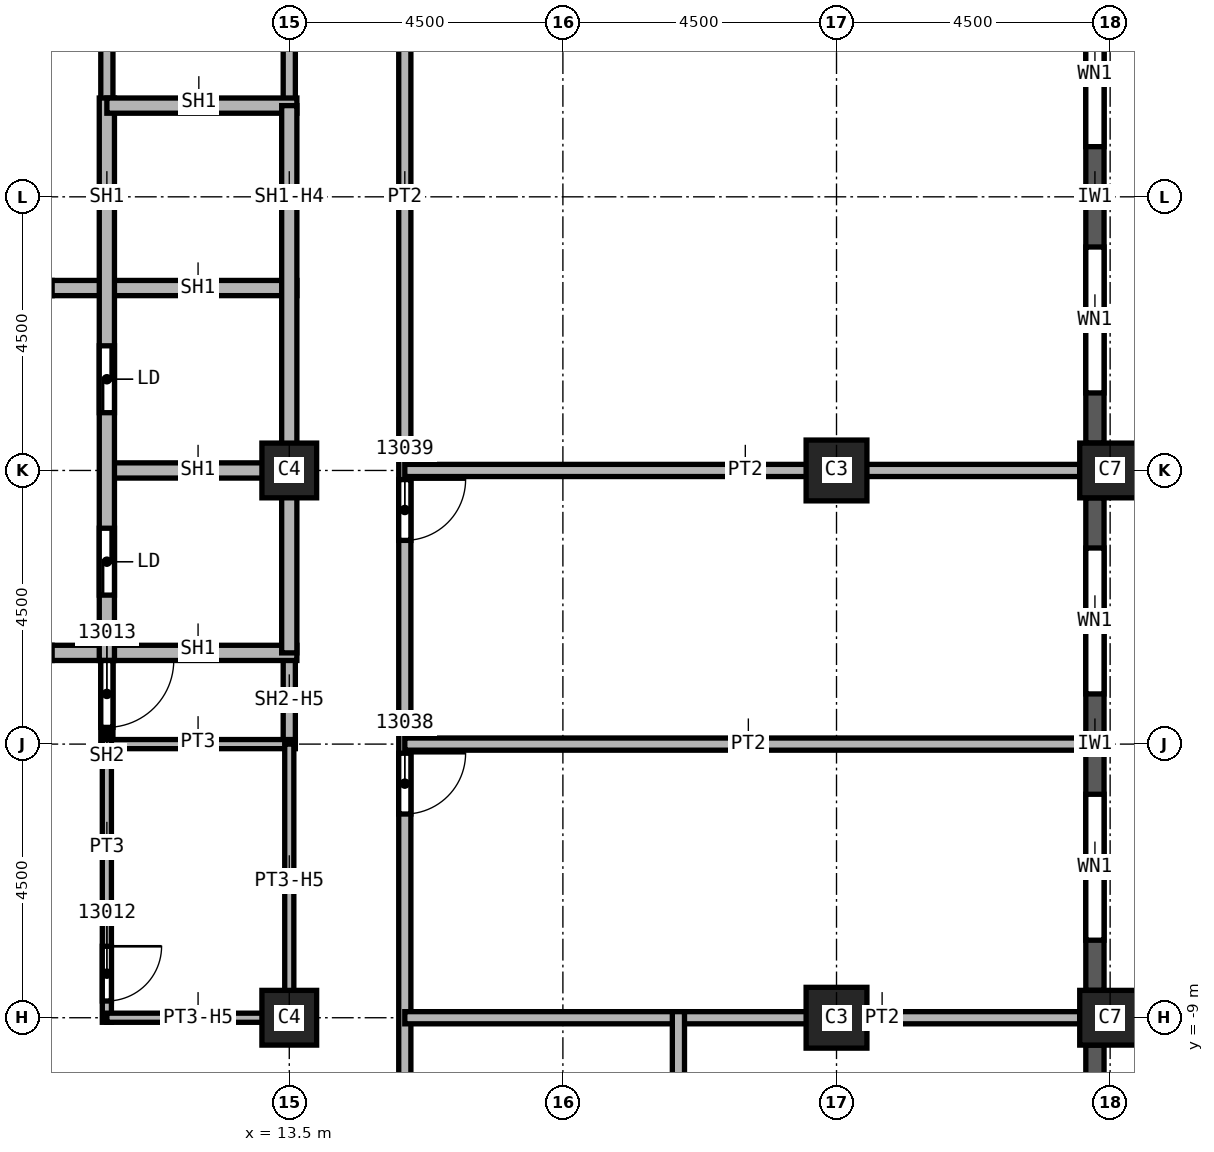
"""IFC4 building model, lengths in metres.
Left out: names, types, materials, properties, quantities, classifications, styles, units other than length and angle.
Written with IfcOpenShell. Run it as: python <this file> out.ifc"""

import sys

from ifc_helpers import new_model, si_unit, direction, frame, frame_2d, origin, origin_2d, place, context, subcontext, project, spatial, rectangle, extrude, element, fill, save


model = new_model("IFC4")
c1 = context("Model", 3, precision=1e-05, world=origin(), true_north=direction((0.0, 1.0)))
c2 = subcontext(c1, "Body", "Model", "MODEL_VIEW")
j1 = project(units=[si_unit("LENGTHUNIT", "METRE"), si_unit("PLANEANGLEUNIT", "RADIAN")], contexts=[c1])
p1 = place(None, origin())
s1 = spatial("IfcSite", under=j1, at=p1, CompositionType="ELEMENT")
p2 = place(p1, origin())
s2 = spatial("IfcBuilding", under=s1, at=p2, CompositionType="ELEMENT")
p3 = place(p2, frame((0.0, 0.0, 208.0)))
s3 = spatial("IfcBuildingStorey", under=s2, at=p3, CompositionType="ELEMENT", Elevation=208.0)
for number, where, z_axis, x_axis in (
    (1, (22.5, 0.0, 0.0), (0.0, 0.0, 1.0), (1.0, 0.0, 0.0)),
    (2, (22.5, -9.0, 0.0), (0.0, 0.0, 1.0), (1.0, 0.0, 0.0)),
):
    element("IfcColumn", number, at=place(p3, frame(where, z_axis=z_axis, x_axis=x_axis)), inside=s3, PredefinedType="COLUMN", context=c2, shape_type="SweptSolid", body=[
        extrude(rectangle(XDim=1.0, YDim=1.0, at=origin_2d()), origin(), (0.0, 0.0, 1.0), 3.72),
    ])
for number, where, z_axis, x_axis in (
    (3, (13.5, 0.0, 0.0), (0.0, 0.0, 1.0), (1.0, 0.0, 0.0)),
    (4, (13.5, -9.0, 0.0), (0.0, 0.0, 1.0), (1.0, 0.0, 0.0)),
):
    element("IfcColumn", number, at=place(p3, frame(where, z_axis=z_axis, x_axis=x_axis)), inside=s3, PredefinedType="COLUMN", context=c2, shape_type="SweptSolid", body=[
        extrude(rectangle(XDim=0.9, YDim=0.9, at=origin_2d()), origin(), (0.0, 0.0, 1.0), 3.72),
    ])
for number, where, z_axis, x_axis in (
    (5, (27.0, 0.0, 0.0), (0.0, 0.0, 1.0), (0.0, 1.0, 0.0)),
    (6, (27.0, -9.0, 0.0), (0.0, 0.0, 1.0), (0.0, 1.0, 0.0)),
):
    element("IfcColumn", number, at=place(p3, frame(where, z_axis=z_axis, x_axis=x_axis)), inside=s3, PredefinedType="COLUMN", context=c2, shape_type="SweptSolid", body=[
        extrude(rectangle(XDim=0.9, YDim=1.0, at=origin_2d()), origin(), (0.0, 0.0, 1.0), 3.72),
    ])
p4 = place(p3, frame((26.75, -17.55, 0.0), z_axis=(0.0, 0.0, 1.0), x_axis=(0.0, 1.0, 0.0)))
e7 = element("IfcWall", 7, at=p4, inside=s3, PredefinedType="SOLIDWALL", context=c2, shape_type="SweptSolid", body=[
    extrude(rectangle(XDim=8.1, YDim=0.3, at=frame_2d((4.05, 0.0))), origin(), (0.0, 0.0, 1.0), 3.12),
])
p5 = place(p4, frame((0.825, 0.0, 0.8)))
e8 = element("IfcOpeningElement", 8, at=p5, cuts=e7, PredefinedType="OPENING", context=c2, shape_type="SweptSolid", body=[
    extrude(rectangle(XDim=2.4, YDim=1.95, at=frame_2d((1.2, 0.975))), frame((0.0, 0.15, 0.0), z_axis=(0.0, -1.0, 0.0), x_axis=(1.0, 0.0, 0.0)), (0.0, 0.0, 1.0), 0.3),
])
p6 = place(p4, frame((4.875, 0.0, 0.8)))
e9 = element("IfcOpeningElement", 9, at=p6, cuts=e7, PredefinedType="OPENING", context=c2, shape_type="SweptSolid", body=[
    extrude(rectangle(XDim=2.4, YDim=1.95, at=frame_2d((1.2, 0.975))), frame((0.0, 0.15, 0.0), z_axis=(0.0, -1.0, 0.0), x_axis=(1.0, 0.0, 0.0)), (0.0, 0.0, 1.0), 0.3),
])
p7 = place(p3, frame((26.75, -8.55, 0.0), z_axis=(0.0, 0.0, 1.0), x_axis=(0.0, 1.0, 0.0)))
e10 = element("IfcWall", 10, at=p7, inside=s3, PredefinedType="SOLIDWALL", context=c2, shape_type="SweptSolid", body=[
    extrude(rectangle(XDim=8.1, YDim=0.3, at=frame_2d((4.05, 0.0))), origin(), (0.0, 0.0, 1.0), 3.12),
])
p8 = place(p7, frame((0.825, 0.0, 0.8)))
e11 = element("IfcOpeningElement", 11, at=p8, cuts=e10, PredefinedType="OPENING", context=c2, shape_type="SweptSolid", body=[
    extrude(rectangle(XDim=2.4, YDim=1.95, at=frame_2d((1.2, 0.975))), frame((0.0, 0.15, 0.0), z_axis=(0.0, -1.0, 0.0), x_axis=(1.0, 0.0, 0.0)), (0.0, 0.0, 1.0), 0.3),
])
p9 = place(p7, frame((4.875, 0.0, 0.8)))
e12 = element("IfcOpeningElement", 12, at=p9, cuts=e10, PredefinedType="OPENING", context=c2, shape_type="SweptSolid", body=[
    extrude(rectangle(XDim=2.4, YDim=1.95, at=frame_2d((1.2, 0.975))), frame((0.0, 0.15, 0.0), z_axis=(0.0, -1.0, 0.0), x_axis=(1.0, 0.0, 0.0)), (0.0, 0.0, 1.0), 0.3),
])
p10 = place(p3, frame((26.75, 0.45, 0.0), z_axis=(0.0, 0.0, 1.0), x_axis=(0.0, 1.0, 0.0)))
e13 = element("IfcWall", 13, at=p10, inside=s3, PredefinedType="SOLIDWALL", context=c2, shape_type="SweptSolid", body=[
    extrude(rectangle(XDim=8.1, YDim=0.3, at=frame_2d((4.05, 0.0))), origin(), (0.0, 0.0, 1.0), 3.12),
])
p11 = place(p10, frame((0.825, 0.0, 0.8)))
e14 = element("IfcOpeningElement", 14, at=p11, cuts=e13, PredefinedType="OPENING", context=c2, shape_type="SweptSolid", body=[
    extrude(rectangle(XDim=2.4, YDim=1.95, at=frame_2d((1.2, 0.975))), frame((0.0, 0.15, 0.0), z_axis=(0.0, -1.0, 0.0), x_axis=(1.0, 0.0, 0.0)), (0.0, 0.0, 1.0), 0.3),
])
p12 = place(p10, frame((4.875, 0.0, 0.8)))
e15 = element("IfcOpeningElement", 15, at=p12, cuts=e13, PredefinedType="OPENING", context=c2, shape_type="SweptSolid", body=[
    extrude(rectangle(XDim=2.4, YDim=1.95, at=frame_2d((1.2, 0.975))), frame((0.0, 0.15, 0.0), z_axis=(0.0, -1.0, 0.0), x_axis=(1.0, 0.0, 0.0)), (0.0, 0.0, 1.0), 0.3),
])
p13 = place(p3, frame((15.4, 22.4, 0.0), z_axis=(0.0, 0.0, 1.0), x_axis=(0.0, -1.0, 0.0)))
e16 = element("IfcWall", 16, at=p13, inside=s3, PredefinedType="PARTITIONING", context=c2, shape_type="SweptSolid", body=[
    extrude(rectangle(XDim=44.8, YDim=0.2, at=frame_2d((22.4, 0.0))), origin(), (0.0, 0.0, 1.0), 3.72),
])
p14 = place(p13, frame((12.5, 0.0, 0.0)))
e17 = element("IfcOpeningElement", 17, at=p14, cuts=e16, PredefinedType="OPENING", context=c2, shape_type="SweptSolid", body=[
    extrude(rectangle(XDim=1.0, YDim=2.1, at=frame_2d((0.5, 1.05))), frame((0.0, 0.1, 0.0), z_axis=(0.0, -1.0, 0.0), x_axis=(1.0, 0.0, 0.0)), (0.0, 0.0, 1.0), 0.2),
])
p15 = place(p13, frame((7.7, 0.0, 0.0)))
e18 = element("IfcOpeningElement", 18, at=p15, cuts=e16, PredefinedType="OPENING", context=c2, shape_type="SweptSolid", body=[
    extrude(rectangle(XDim=1.0, YDim=2.1, at=frame_2d((0.5, 1.05))), frame((0.0, 0.1, 0.0), z_axis=(0.0, -1.0, 0.0), x_axis=(1.0, 0.0, 0.0)), (0.0, 0.0, 1.0), 0.2),
])
p16 = place(p13, frame((3.25, 0.0, 0.0)))
e19 = element("IfcOpeningElement", 19, at=p16, cuts=e16, PredefinedType="OPENING", context=c2, shape_type="SweptSolid", body=[
    extrude(rectangle(XDim=1.0, YDim=2.1, at=frame_2d((0.5, 1.05))), frame((0.0, 0.1, 0.0), z_axis=(0.0, -1.0, 0.0), x_axis=(1.0, 0.0, 0.0)), (0.0, 0.0, 1.0), 0.2),
])
p17 = place(p13, frame((42.05, 0.0, 0.0)))
e20 = element("IfcOpeningElement", 20, at=p17, cuts=e16, PredefinedType="OPENING", context=c2, shape_type="SweptSolid", body=[
    extrude(rectangle(XDim=1.0, YDim=2.1, at=frame_2d((0.5, 1.05))), frame((0.0, 0.1, 0.0), z_axis=(0.0, -1.0, 0.0), x_axis=(1.0, 0.0, 0.0)), (0.0, 0.0, 1.0), 0.2),
])
p18 = place(p13, frame((34.4, 0.0, 0.0)))
e21 = element("IfcOpeningElement", 21, at=p18, cuts=e16, PredefinedType="OPENING", context=c2, shape_type="SweptSolid", body=[
    extrude(rectangle(XDim=1.0, YDim=2.1, at=frame_2d((0.5, 1.05))), frame((0.0, 0.1, 0.0), z_axis=(0.0, -1.0, 0.0), x_axis=(1.0, 0.0, 0.0)), (0.0, 0.0, 1.0), 0.2),
])
p19 = place(p13, frame((27.05, 0.0, 0.0)))
e22 = element("IfcOpeningElement", 22, at=p19, cuts=e16, PredefinedType="OPENING", context=c2, shape_type="SweptSolid", body=[
    extrude(rectangle(XDim=1.0, YDim=2.1, at=frame_2d((0.5, 1.05))), frame((0.0, 0.1, 0.0), z_axis=(0.0, -1.0, 0.0), x_axis=(1.0, 0.0, 0.0)), (0.0, 0.0, 1.0), 0.2),
])
p20 = place(p13, frame((22.55, 0.0, 0.0)))
e23 = element("IfcOpeningElement", 23, at=p20, cuts=e16, PredefinedType="OPENING", context=c2, shape_type="SweptSolid", body=[
    extrude(rectangle(XDim=1.0, YDim=2.1, at=frame_2d((0.5, 1.05))), frame((0.0, 0.1, 0.0), z_axis=(0.0, -1.0, 0.0), x_axis=(1.0, 0.0, 0.0)), (0.0, 0.0, 1.0), 0.2),
])
p21 = place(p3, frame((15.4, -9.0, 0.0), z_axis=(0.0, 0.0, 1.0), x_axis=(1.0, 0.0, 0.0)))
e24 = element("IfcWall", 24, at=p21, inside=s3, PredefinedType="PARTITIONING", context=c2, shape_type="SweptSolid", body=[
    extrude(rectangle(XDim=11.1, YDim=0.2, at=frame_2d((5.55, 0.0))), origin(), (0.0, 0.0, 1.0), 3.72),
])
p22 = place(p3, frame((15.4, -4.5, 0.0), z_axis=(0.0, 0.0, 1.0), x_axis=(1.0, 0.0, 0.0)))
e25 = element("IfcWall", 25, at=p22, inside=s3, PredefinedType="PARTITIONING", context=c2, shape_type="SweptSolid", body=[
    extrude(rectangle(XDim=11.2, YDim=0.2, at=frame_2d((5.6, 0.0))), origin(), (0.0, 0.0, 1.0), 3.72),
])
p23 = place(p3, frame((19.9, -8.9, 0.0), z_axis=(0.0, 0.0, 1.0), x_axis=(0.0, -1.0, 0.0)))
e26 = element("IfcWall", 26, at=p23, inside=s3, PredefinedType="PARTITIONING", context=c2, shape_type="SweptSolid", body=[
    extrude(rectangle(XDim=13.5, YDim=0.2, at=frame_2d((6.75, 0.0))), origin(), (0.0, 0.0, 1.0), 3.72),
])
p24 = place(p23, frame((2.2, 0.0, 0.0)))
e27 = element("IfcOpeningElement", 27, at=p24, cuts=e26, PredefinedType="OPENING", context=c2, shape_type="SweptSolid", body=[
    extrude(rectangle(XDim=1.0, YDim=2.1, at=frame_2d((0.5, 1.05))), frame((0.0, 0.1, 0.0), z_axis=(0.0, -1.0, 0.0), x_axis=(1.0, 0.0, 0.0)), (0.0, 0.0, 1.0), 0.2),
])
p25 = place(p3, frame((26.5, 0.0, 0.0), z_axis=(0.0, 0.0, 1.0), x_axis=(-1.0, 0.0, 0.0)))
e28 = element("IfcWall", 28, at=p25, inside=s3, PredefinedType="PARTITIONING", context=c2, shape_type="SweptSolid", body=[
    extrude(rectangle(XDim=11.1, YDim=0.2, at=frame_2d((5.55, 0.0))), origin(), (0.0, 0.0, 1.0), 3.72),
])
p26 = place(p3, frame((10.5, -2.875, 0.0), z_axis=(0.0, 0.0, 1.0), x_axis=(0.0, -1.0, 0.0)))
e29 = element("IfcWall", 29, at=p26, inside=s3, PredefinedType="SOLIDWALL", context=c2, shape_type="SweptSolid", body=[
    extrude(rectangle(XDim=1.7, YDim=0.2, at=frame_2d((0.85, 0.0))), origin(), (0.0, 0.0, 1.0), 3.72),
])
p27 = place(p26, frame((0.25, 0.0, 0.0)))
e30 = element("IfcOpeningElement", 30, at=p27, cuts=e29, PredefinedType="OPENING", context=c2, shape_type="SweptSolid", body=[
    extrude(rectangle(XDim=1.1, YDim=2.1, at=frame_2d((0.55, 1.05))), frame((0.0, 0.1, 0.0), z_axis=(0.0, -1.0, 0.0), x_axis=(1.0, 0.0, 0.0)), (0.0, 0.0, 1.0), 0.2),
])
p28 = place(p3, frame((10.5, 9.1, 0.0), z_axis=(0.0, 0.0, 1.0), x_axis=(0.0, -1.0, 0.0)))
e31 = element("IfcWall", 31, at=p28, inside=s3, PredefinedType="SOLIDWALL", context=c2, shape_type="SweptSolid", body=[
    extrude(rectangle(XDim=3.225, YDim=0.2, at=frame_2d((1.613, 0.0))), origin(), (0.0, 0.0, 1.0), 3.72),
])
p29 = place(p28, frame((1.0, 0.0, 0.0)))
e32 = element("IfcOpeningElement", 32, at=p29, cuts=e31, PredefinedType="OPENING", context=c2, shape_type="SweptSolid", body=[
    extrude(rectangle(XDim=1.1, YDim=2.1, at=frame_2d((0.55, 1.05))), frame((0.0, 0.1, 0.0), z_axis=(0.0, -1.0, 0.0), x_axis=(1.0, 0.0, 0.0)), (0.0, 0.0, 1.0), 0.2),
])
p30 = place(p3, frame((13.5, -3.0, 0.0), z_axis=(0.0, 0.0, 1.0), x_axis=(0.0, -1.0, 0.0)))
e33 = element("IfcWall", 33, at=p30, inside=s3, PredefinedType="SOLIDWALL", context=c2, shape_type="SweptSolid", body=[
    extrude(rectangle(XDim=1.5, YDim=0.2, at=frame_2d((0.75, 0.0))), origin(), (0.0, 0.0, 1.0), 2.958),
])
p31 = place(p3, frame((13.5, 9.1, 0.0), z_axis=(0.0, 0.0, 1.0), x_axis=(0.0, -1.0, 0.0)))
e34 = element("IfcWall", 34, at=p31, inside=s3, PredefinedType="SOLIDWALL", context=c2, shape_type="SweptSolid", body=[
    extrude(rectangle(XDim=3.1, YDim=0.2, at=frame_2d((1.55, 0.0))), origin(), (0.0, 0.0, 1.0), 2.958),
])
p32 = place(p3, frame((4.375, -3.0, 0.0), z_axis=(0.0, 0.0, 1.0), x_axis=(1.0, 0.0, 0.0)))
e35 = element("IfcWall", 35, at=p32, inside=s3, PredefinedType="SOLIDWALL", context=c2, shape_type="SweptSolid", body=[
    extrude(rectangle(XDim=9.25, YDim=0.25, at=frame_2d((4.625, 0.0))), origin(), (0.0, 0.0, 1.0), 3.72),
])
p33 = place(p32, frame((4.125, 0.0, 0.0)))
e36 = element("IfcOpeningElement", 36, at=p33, cuts=e35, PredefinedType="OPENING", context=c2, shape_type="SweptSolid", body=[
    extrude(rectangle(XDim=1.1, YDim=2.1, at=frame_2d((0.55, 1.05))), frame((0.0, 0.125, 0.0), z_axis=(0.0, -1.0, 0.0), x_axis=(1.0, 0.0, 0.0)), (0.0, 0.0, 1.0), 0.25),
])
p34 = place(p3, frame((7.5, 3.0, 0.0), z_axis=(0.0, 0.0, 1.0), x_axis=(1.0, 0.0, 0.0)))
e37 = element("IfcWall", 37, at=p34, inside=s3, PredefinedType="SOLIDWALL", context=c2, shape_type="SweptSolid", body=[
    extrude(rectangle(XDim=6.125, YDim=0.25, at=frame_2d((3.062, 0.0))), origin(), (0.0, 0.0, 1.0), 3.72),
])
p35 = place(p34, frame((1.0, 0.0, 0.0)))
e38 = element("IfcOpeningElement", 38, at=p35, cuts=e37, PredefinedType="OPENING", context=c2, shape_type="SweptSolid", body=[
    extrude(rectangle(XDim=1.1, YDim=2.1, at=frame_2d((0.55, 1.05))), frame((0.0, 0.125, 0.0), z_axis=(0.0, -1.0, 0.0), x_axis=(1.0, 0.0, 0.0)), (0.0, 0.0, 1.0), 0.25),
])
p36 = place(p3, frame((10.5, 0.0, 0.0), z_axis=(0.0, 0.0, 1.0), x_axis=(1.0, 0.0, 0.0)))
e39 = element("IfcWall", 39, at=p36, inside=s3, PredefinedType="SOLIDWALL", context=c2, shape_type="SweptSolid", body=[
    extrude(rectangle(XDim=3.125, YDim=0.25, at=frame_2d((1.562, 0.0))), origin(), (0.0, 0.0, 1.0), 3.72),
])
p37 = place(p3, frame((10.5, 6.125, 0.0), z_axis=(0.0, 0.0, 1.0), x_axis=(0.0, -1.0, 0.0)))
e40 = element("IfcWall", 40, at=p37, inside=s3, PredefinedType="SOLIDWALL", context=c2, shape_type="SweptSolid", body=[
    extrude(rectangle(XDim=9.25, YDim=0.25, at=frame_2d((4.625, 0.0))), origin(), (0.0, 0.0, 1.0), 3.72),
])
p38 = place(p37, frame((7.075, 0.0, 0.0)))
e41 = element("IfcOpeningElement", 41, at=p38, cuts=e40, PredefinedType="OPENING", context=c2, shape_type="SweptSolid", body=[
    extrude(rectangle(XDim=1.1, YDim=2.1, at=frame_2d((0.55, 1.05))), frame((0.0, 0.125, 0.0), z_axis=(0.0, -1.0, 0.0), x_axis=(1.0, 0.0, 0.0)), (0.0, 0.0, 1.0), 0.25),
])
p39 = place(p37, frame((4.075, 0.0, 0.0)))
e42 = element("IfcOpeningElement", 42, at=p39, cuts=e40, PredefinedType="OPENING", context=c2, shape_type="SweptSolid", body=[
    extrude(rectangle(XDim=1.1, YDim=2.1, at=frame_2d((0.55, 1.05))), frame((0.0, 0.125, 0.0), z_axis=(0.0, -1.0, 0.0), x_axis=(1.0, 0.0, 0.0)), (0.0, 0.0, 1.0), 0.25),
])
p40 = place(p3, frame((10.5, 6.0, 0.0), z_axis=(0.0, 0.0, 1.0), x_axis=(1.0, 0.0, 0.0)))
e43 = element("IfcWall", 43, at=p40, inside=s3, PredefinedType="SOLIDWALL", context=c2, shape_type="SweptSolid", body=[
    extrude(rectangle(XDim=3.125, YDim=0.25, at=frame_2d((1.562, 0.0))), origin(), (0.0, 0.0, 1.0), 3.72),
])
p41 = place(p3, frame((13.5, 6.0, 0.0), z_axis=(0.0, 0.0, 1.0), x_axis=(0.0, -1.0, 0.0)))
e44 = element("IfcWall", 44, at=p41, inside=s3, PredefinedType="SOLIDWALL", context=c2, shape_type="SweptSolid", body=[
    extrude(rectangle(XDim=9.0, YDim=0.25, at=frame_2d((4.5, 0.0))), origin(), (0.0, 0.0, 1.0), 2.958),
])
p42 = place(p3, frame((10.5, -4.5, 0.0), z_axis=(0.0, 0.0, 1.0), x_axis=(1.0, 0.0, 0.0)))
e45 = element("IfcWall", 45, at=p42, inside=s3, PredefinedType="PARTITIONING", context=c2, shape_type="SweptSolid", body=[
    extrude(rectangle(XDim=3.1, YDim=0.15, at=frame_2d((1.55, 0.0))), origin(), (0.0, 0.0, 1.0), 3.72),
])
p43 = place(p3, frame((10.5, -4.425, 0.0), z_axis=(0.0, 0.0, 1.0), x_axis=(0.0, -1.0, 0.0)))
e46 = element("IfcWall", 46, at=p43, inside=s3, PredefinedType="PARTITIONING", context=c2, shape_type="SweptSolid", body=[
    extrude(rectangle(XDim=4.65, YDim=0.15, at=frame_2d((2.325, 0.0))), origin(), (0.0, 0.0, 1.0), 3.72),
])
p44 = place(p43, frame((3.4, 0.0, 0.0)))
e47 = element("IfcOpeningElement", 47, at=p44, cuts=e46, PredefinedType="OPENING", context=c2, shape_type="SweptSolid", body=[
    extrude(rectangle(XDim=0.9, YDim=2.1, at=frame_2d((0.45, 1.05))), frame((0.0, 0.075, 0.0), z_axis=(0.0, -1.0, 0.0), x_axis=(1.0, 0.0, 0.0)), (0.0, 0.0, 1.0), 0.15),
])
p45 = place(p3, frame((13.5, -9.0, 0.0), z_axis=(0.0, 0.0, 1.0), x_axis=(-1.0, 0.0, 0.0)))
e48 = element("IfcWall", 48, at=p45, inside=s3, PredefinedType="PARTITIONING", context=c2, shape_type="SweptSolid", body=[
    extrude(rectangle(XDim=3.0, YDim=0.15, at=frame_2d((1.5, 0.0))), origin(), (0.0, 0.0, 1.0), 2.958),
])
p46 = place(p3, frame((13.5, -4.5, 0.0), z_axis=(0.0, 0.0, 1.0), x_axis=(0.0, -1.0, 0.0)))
e49 = element("IfcWall", 49, at=p46, inside=s3, PredefinedType="PARTITIONING", context=c2, shape_type="SweptSolid", body=[
    extrude(rectangle(XDim=4.575, YDim=0.15, at=frame_2d((2.288, 0.0))), origin(), (0.0, 0.0, 1.0), 2.958),
])
p47 = place(p8, origin())
e50 = element("IfcWindow", 50, at=p47, inside=s3, PartitioningType="SINGLE_PANEL", PredefinedType="WINDOW", context=c2, shape_type="SweptSolid", body=[
    extrude(rectangle(XDim=2.4, YDim=1.95, at=frame_2d((1.2, 0.975))), frame((0.0, 0.03, 0.0), z_axis=(0.0, -1.0, 0.0), x_axis=(1.0, 0.0, 0.0)), (0.0, 0.0, 1.0), 0.06),
])
fill(e11, e50)
p48 = place(p9, origin())
e51 = element("IfcWindow", 51, at=p48, inside=s3, PartitioningType="SINGLE_PANEL", PredefinedType="WINDOW", context=c2, shape_type="SweptSolid", body=[
    extrude(rectangle(XDim=2.4, YDim=1.95, at=frame_2d((1.2, 0.975))), frame((0.0, 0.03, 0.0), z_axis=(0.0, -1.0, 0.0), x_axis=(1.0, 0.0, 0.0)), (0.0, 0.0, 1.0), 0.06),
])
fill(e12, e51)
p49 = place(p11, origin())
e52 = element("IfcWindow", 52, at=p49, inside=s3, PartitioningType="SINGLE_PANEL", PredefinedType="WINDOW", context=c2, shape_type="SweptSolid", body=[
    extrude(rectangle(XDim=2.4, YDim=1.95, at=frame_2d((1.2, 0.975))), frame((0.0, 0.03, 0.0), z_axis=(0.0, -1.0, 0.0), x_axis=(1.0, 0.0, 0.0)), (0.0, 0.0, 1.0), 0.06),
])
fill(e14, e52)
p50 = place(p12, origin())
e53 = element("IfcWindow", 53, at=p50, inside=s3, PartitioningType="SINGLE_PANEL", PredefinedType="WINDOW", context=c2, shape_type="SweptSolid", body=[
    extrude(rectangle(XDim=2.4, YDim=1.95, at=frame_2d((1.2, 0.975))), frame((0.0, 0.03, 0.0), z_axis=(0.0, -1.0, 0.0), x_axis=(1.0, 0.0, 0.0)), (0.0, 0.0, 1.0), 0.06),
])
fill(e15, e53)
p51 = place(p44, origin())
e54 = element("IfcDoor", 54, at=p51, inside=s3, OperationType="SINGLE_SWING_LEFT", PredefinedType="DOOR", context=c2, shape_type="SweptSolid", body=[
    extrude(rectangle(XDim=0.9, YDim=2.1, at=frame_2d((0.45, 1.05))), frame((0.0, 0.025, 0.0), z_axis=(0.0, -1.0, 0.0), x_axis=(1.0, 0.0, 0.0)), (0.0, 0.0, 1.0), 0.05),
])
fill(e47, e54)
p52 = place(p27, origin())
e55 = element("IfcDoor", 55, at=p52, inside=s3, OperationType="SINGLE_SWING_RIGHT", PredefinedType="DOOR", context=c2, shape_type="SweptSolid", body=[
    extrude(rectangle(XDim=1.1, YDim=2.1, at=frame_2d((0.55, 1.05))), frame((0.0, 0.025, 0.0), z_axis=(0.0, -1.0, 0.0), x_axis=(1.0, 0.0, 0.0)), (0.0, 0.0, 1.0), 0.05),
])
fill(e30, e55)
p53 = place(p19, origin())
e56 = element("IfcDoor", 56, at=p53, inside=s3, OperationType="SINGLE_SWING_LEFT", PredefinedType="DOOR", context=c2, shape_type="SweptSolid", body=[
    extrude(rectangle(XDim=1.0, YDim=2.1, at=frame_2d((0.5, 1.05))), frame((0.0, 0.025, 0.0), z_axis=(0.0, -1.0, 0.0), x_axis=(1.0, 0.0, 0.0)), (0.0, 0.0, 1.0), 0.05),
])
fill(e22, e56)
p54 = place(p20, origin())
e57 = element("IfcDoor", 57, at=p54, inside=s3, OperationType="SINGLE_SWING_RIGHT", PredefinedType="DOOR", context=c2, shape_type="SweptSolid", body=[
    extrude(rectangle(XDim=1.0, YDim=2.1, at=frame_2d((0.5, 1.05))), frame((0.0, 0.025, 0.0), z_axis=(0.0, -1.0, 0.0), x_axis=(1.0, 0.0, 0.0)), (0.0, 0.0, 1.0), 0.05),
])
fill(e23, e57)
p55 = place(p38, origin())
e58 = element("IfcDoor", 58, at=p55, inside=s3, OperationType="SLIDING_TO_LEFT", PredefinedType="DOOR", context=c2, shape_type="SweptSolid", body=[
    extrude(rectangle(XDim=1.1, YDim=2.1, at=frame_2d((0.55, 1.05))), frame((0.0, 0.025, 0.0), z_axis=(0.0, -1.0, 0.0), x_axis=(1.0, 0.0, 0.0)), (0.0, 0.0, 1.0), 0.05),
])
fill(e41, e58)
p56 = place(p39, origin())
e59 = element("IfcDoor", 59, at=p56, inside=s3, OperationType="SLIDING_TO_LEFT", PredefinedType="DOOR", context=c2, shape_type="SweptSolid", body=[
    extrude(rectangle(XDim=1.1, YDim=2.1, at=frame_2d((0.55, 1.05))), frame((0.0, 0.025, 0.0), z_axis=(0.0, -1.0, 0.0), x_axis=(1.0, 0.0, 0.0)), (0.0, 0.0, 1.0), 0.05),
])
fill(e42, e59)
save(model, sys.argv[1])
